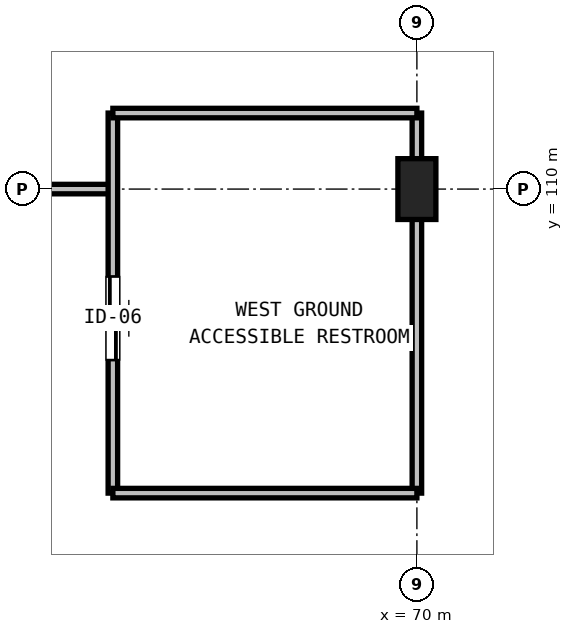
"""IFC4 building model, lengths in metres.
Left out: names, types, materials, properties, quantities, classifications, styles, units other than length and angle.
Written with IfcOpenShell. Run it as: python <this file> out.ifc"""

import sys

from ifc_helpers import new_model, si_unit, direction, frame, frame_2d, origin, origin_2d, place, context, subcontext, project, spatial, rectangle, extrude, element, fill, save


model = new_model("IFC4")
c1 = context("Model", 3, precision=1e-05, world=origin(), true_north=direction((0.0, 1.0)))
c2 = subcontext(c1, "Body", "Model", "MODEL_VIEW")
j1 = project(units=[si_unit("LENGTHUNIT", "METRE"), si_unit("PLANEANGLEUNIT", "RADIAN")], contexts=[c1])
p1 = place(None, origin())
s1 = spatial("IfcSite", under=j1, at=p1, CompositionType="ELEMENT")
p2 = place(p1, origin())
s2 = spatial("IfcBuilding", under=s1, at=p2, CompositionType="ELEMENT")
p3 = place(p2, origin())
s3 = spatial("IfcBuildingStorey", under=s2, at=p3, CompositionType="ELEMENT", Elevation=0.0)
p4 = place(p3, frame((70.0, 110.0, 0.0), z_axis=(0.0, 0.0, 1.0), x_axis=(1.0, 0.0, 0.0)))
e1 = element("IfcColumn", 1, at=p4, inside=s3, PredefinedType="COLUMN", context=c2, shape_type="SweptSolid", body=[
    extrude(rectangle(XDim=0.5, YDim=0.8, at=origin_2d()), origin(), (0.0, 0.0, 1.0), 5.4),
])
p5 = place(p3, frame((54.25, 110.0, 0.0), z_axis=(0.0, 0.0, 1.0), x_axis=(1.0, 0.0, 0.0)))
e2 = element("IfcWall", 2, at=p5, inside=s3, PredefinedType="PARTITIONING", context=c2, shape_type="SweptSolid", body=[
    extrude(rectangle(XDim=11.75, YDim=0.125, at=frame_2d((5.875, 0.0))), origin(), (0.0, 0.0, 1.0), 4.24),
])
p6 = place(p3, frame((66.0, 106.0, 0.0), z_axis=(0.0, 0.0, 1.0), x_axis=(0.0, 1.0, 0.0)))
e3 = element("IfcWall", 3, at=p6, inside=s3, PredefinedType="PARTITIONING", context=c2, shape_type="SweptSolid", body=[
    extrude(rectangle(XDim=5.0, YDim=0.125, at=frame_2d((2.5, 0.0))), origin(), (0.0, 0.0, 1.0), 5.1),
])
p7 = place(p6, frame((1.75, 0.0, 0.0)))
e4 = element("IfcOpeningElement", 4, at=p7, cuts=e3, PredefinedType="OPENING", context=c2, shape_type="SweptSolid", body=[
    extrude(rectangle(XDim=1.1, YDim=2.15, at=frame_2d((0.55, 1.075))), frame((0.0, 0.073, 0.0), z_axis=(0.0, -1.0, 0.0), x_axis=(1.0, 0.0, 0.0)), (0.0, 0.0, 1.0), 0.145),
])
p8 = place(p3, frame((70.0, 106.0, 0.0), z_axis=(0.0, 0.0, 1.0), x_axis=(0.0, 1.0, 0.0)))
e5 = element("IfcWall", 5, at=p8, inside=s3, PredefinedType="PARTITIONING", context=c2, shape_type="SweptSolid", body=[
    extrude(rectangle(XDim=5.0, YDim=0.125, at=frame_2d((2.5, 0.0))), origin(), (0.0, 0.0, 1.0), 4.49),
])
for number, where, z_axis, x_axis in (
    (6, (66.0, 111.0, 0.0), (0.0, 0.0, 1.0), (1.0, 0.0, 0.0)),
    (7, (66.0, 106.0, 0.0), (0.0, 0.0, 1.0), (1.0, 0.0, 0.0)),
):
    element("IfcWall", number, at=place(p3, frame(where, z_axis=z_axis, x_axis=x_axis)), inside=s3, PredefinedType="PARTITIONING", context=c2, shape_type="SweptSolid", body=[
        extrude(rectangle(XDim=4.0, YDim=0.125, at=frame_2d((2.0, 0.0))), origin(), (0.0, 0.0, 1.0), 5.1),
    ])
p9 = place(p7, frame((1.1, 0.0, 0.0), z_axis=(0.0, 0.0, 1.0), x_axis=(-1.0, 0.0, 0.0)))
e8 = element("IfcDoor", 8, at=p9, inside=s3, OperationType="SLIDING_TO_RIGHT", PredefinedType="DOOR", context=c2, shape_type="SweptSolid", body=[
    extrude(rectangle(XDim=1.1, YDim=2.15, at=frame_2d((0.55, 1.075))), frame((0.0, 0.025, 0.0), z_axis=(0.0, -1.0, 0.0), x_axis=(1.0, 0.0, 0.0)), (0.0, 0.0, 1.0), 0.05),
])
fill(e4, e8)
save(model, sys.argv[1])
